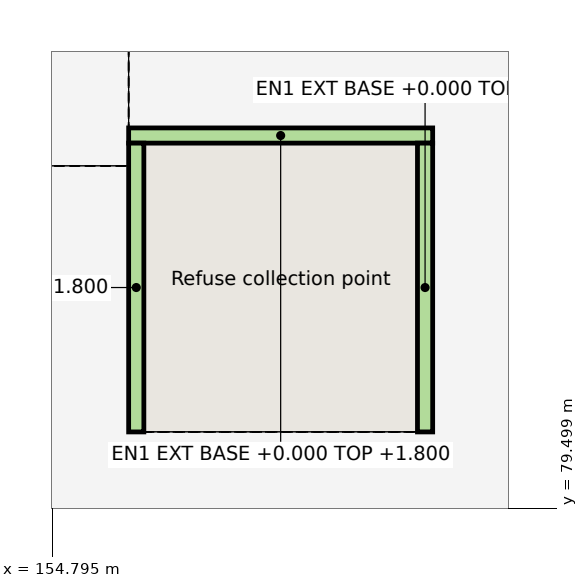
"""IFC4 building model, lengths in metres.
Left out: names, types, materials, properties, quantities, classifications, styles, units other than length and angle.
Written with IfcOpenShell. Run it as: python <this file> out.ifc"""

import sys

from ifc_helpers import new_model, si_unit, direction, frame, frame_2d, origin, place, context, subcontext, project, spatial, rectangle, extrude, element, save


model = new_model("IFC4")
c1 = context("Model", 3, precision=1e-05, world=origin(), true_north=direction((0.0, 1.0)))
c2 = subcontext(c1, "Body", "Model", "MODEL_VIEW")
j1 = project(units=[si_unit("LENGTHUNIT", "METRE"), si_unit("PLANEANGLEUNIT", "RADIAN")], contexts=[c1])
p1 = place(None, origin())
s1 = spatial("IfcSite", under=j1, at=p1, CompositionType="ELEMENT")
p2 = place(p1, origin())
s2 = spatial("IfcBuilding", under=s1, at=p2, CompositionType="ELEMENT")
p3 = place(p2, origin())
s3 = spatial("IfcBuildingStorey", under=s2, at=p3, CompositionType="ELEMENT", Elevation=0.0)
p4 = place(p3, frame((155.8, 84.4, 0.0), z_axis=(0.0, 0.0, 1.0), x_axis=(1.0, 0.0, 0.0)))
e1 = element("IfcWall", 1, at=p4, inside=s3, PredefinedType="SOLIDWALL", context=c2, shape_type="SweptSolid", body=[
    extrude(rectangle(XDim=4.0, YDim=0.2, at=frame_2d((2.0, 0.0))), origin(), (0.0, 0.0, 1.0), 1.8),
])
for number, where, z_axis, x_axis in (
    (2, (159.7, 80.5, 0.0), (0.0, 0.0, 1.0), (0.0, 1.0, 0.0)),
    (3, (155.9, 80.5, 0.0), (0.0, 0.0, 1.0), (0.0, 1.0, 0.0)),
):
    element("IfcWall", number, at=place(p3, frame(where, z_axis=z_axis, x_axis=x_axis)), inside=s3, PredefinedType="SOLIDWALL", context=c2, shape_type="SweptSolid", body=[
        extrude(rectangle(XDim=3.8, YDim=0.2, at=frame_2d((1.9, 0.0))), origin(), (0.0, 0.0, 1.0), 1.8),
    ])
save(model, sys.argv[1])
